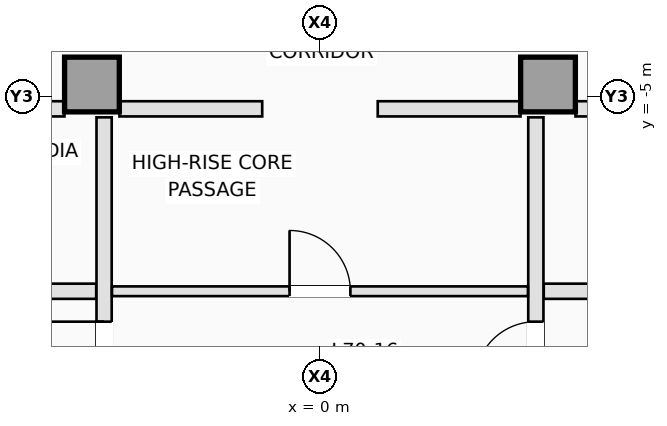
"""IFC4 building model, lengths in metres.
Left out: names, types, materials, properties, quantities, classifications, styles, units other than length and angle.
Written with IfcOpenShell. Run it as: python <this file> out.ifc"""

import sys

from ifc_helpers import new_model, si_unit, direction, frame, frame_2d, origin, origin_2d, place, context, subcontext, project, spatial, rectangle, extrude, element, fill, save


model = new_model("IFC4")
c1 = context("Model", 3, precision=1e-05, world=origin(), true_north=direction((0.0, 1.0)))
c2 = subcontext(c1, "Body", "Model", "MODEL_VIEW")
j1 = project(units=[si_unit("LENGTHUNIT", "METRE"), si_unit("PLANEANGLEUNIT", "RADIAN")], contexts=[c1])
p1 = place(None, origin())
s1 = spatial("IfcSite", under=j1, at=p1, CompositionType="ELEMENT")
p2 = place(p1, origin())
s2 = spatial("IfcBuilding", under=s1, at=p2, CompositionType="ELEMENT")
p3 = place(p2, frame((0.0, 0.0, 253.4)))
s3 = spatial("IfcBuildingStorey", under=s2, at=p3, CompositionType="ELEMENT", Elevation=253.4)
for number, where, z_axis, x_axis in (
    (1, (-3.75, -4.8, 0.0), (0.0, 0.0, 1.0), (1.0, 0.0, 0.0)),
    (2, (3.75, -4.8, 0.0), (0.0, 0.0, 1.0), (1.0, 0.0, 0.0)),
):
    element("IfcColumn", number, at=place(p3, frame(where, z_axis=z_axis, x_axis=x_axis)), inside=s3, PredefinedType="COLUMN", context=c2, shape_type="SweptSolid", body=[
        extrude(rectangle(XDim=0.9, YDim=0.9, at=origin_2d()), origin(), (0.0, 0.0, 1.0), 3.5),
    ])
for number, where, z_axis, x_axis in (
    (3, (-8.92, -8.2, 0.0), (0.0, 0.0, 1.0), (1.0, 0.0, 0.0)),
    (4, (3.68, -8.2, 0.0), (0.0, 0.0, 1.0), (1.0, 0.0, 0.0)),
):
    element("IfcWall", number, at=place(p3, frame(where, z_axis=z_axis, x_axis=x_axis)), inside=s3, PredefinedType="PARTITIONING", context=c2, shape_type="SweptSolid", body=[
        extrude(rectangle(XDim=5.24, YDim=0.25, at=frame_2d((2.62, 0.0))), origin(), (0.0, 0.0, 1.0), 3.25),
    ])
p4 = place(p3, frame((-3.55, -15.898, 0.0), z_axis=(0.0, 0.0, 1.0), x_axis=(0.0, 1.0, 0.0)))
e5 = element("IfcWall", 5, at=p4, inside=s3, PredefinedType="PARTITIONING", context=c2, shape_type="SweptSolid", body=[
    extrude(rectangle(XDim=10.558, YDim=0.25, at=frame_2d((5.279, 0.0))), origin(), (0.0, 0.0, 1.0), 3.25),
])
p5 = place(p4, frame((6.198, 0.0, 0.0)))
e6 = element("IfcOpeningElement", 6, at=p5, cuts=e5, PredefinedType="OPENING", context=c2, shape_type="SweptSolid", body=[
    extrude(rectangle(XDim=1.0, YDim=2.15, at=frame_2d((0.5, 1.075))), frame((0.0, 0.135, 0.0), z_axis=(0.0, -1.0, 0.0), x_axis=(1.0, 0.0, 0.0)), (0.0, 0.0, 1.0), 0.27),
])
p6 = place(p3, frame((3.55, -15.898, 0.0), z_axis=(0.0, 0.0, 1.0), x_axis=(0.0, 1.0, 0.0)))
e7 = element("IfcWall", 7, at=p6, inside=s3, PredefinedType="PARTITIONING", context=c2, shape_type="SweptSolid", body=[
    extrude(rectangle(XDim=10.558, YDim=0.25, at=frame_2d((5.279, 0.0))), origin(), (0.0, 0.0, 1.0), 3.25),
])
p7 = place(p6, frame((6.198, 0.0, 0.0)))
e8 = element("IfcOpeningElement", 8, at=p7, cuts=e7, PredefinedType="OPENING", context=c2, shape_type="SweptSolid", body=[
    extrude(rectangle(XDim=1.0, YDim=2.15, at=frame_2d((0.5, 1.075))), frame((0.0, 0.135, 0.0), z_axis=(0.0, -1.0, 0.0), x_axis=(1.0, 0.0, 0.0)), (0.0, 0.0, 1.0), 0.27),
])
p8 = place(p3, frame((-12.48, -5.2, 0.0), z_axis=(0.0, 0.0, 1.0), x_axis=(1.0, 0.0, 0.0)))
e9 = element("IfcWall", 9, at=p8, inside=s3, PredefinedType="PARTITIONING", context=c2, shape_type="SweptSolid", body=[
    extrude(rectangle(XDim=8.278, YDim=0.25, at=frame_2d((4.139, 0.0))), origin(), (0.0, 0.0, 1.0), 3.25),
])
p9 = place(p8, frame((3.05, 0.0, 0.0)))
e10 = element("IfcOpeningElement", 10, at=p9, cuts=e9, PredefinedType="OPENING", context=c2, shape_type="SweptSolid", body=[
    extrude(rectangle(XDim=0.92, YDim=2.12, at=frame_2d((0.46, 1.06))), frame((0.0, 0.135, 0.0), z_axis=(0.0, -1.0, 0.0), x_axis=(1.0, 0.0, 0.0)), (0.0, 0.0, 1.0), 0.27),
])
p10 = place(p8, frame((6.15, 0.0, 0.0)))
e11 = element("IfcOpeningElement", 11, at=p10, cuts=e9, PredefinedType="OPENING", context=c2, shape_type="SweptSolid", body=[
    extrude(rectangle(XDim=0.92, YDim=2.12, at=frame_2d((0.46, 1.06))), frame((0.0, 0.135, 0.0), z_axis=(0.0, -1.0, 0.0), x_axis=(1.0, 0.0, 0.0)), (0.0, 0.0, 1.0), 0.27),
])
p11 = place(p3, frame((4.202, -5.2, 0.0), z_axis=(0.0, 0.0, 1.0), x_axis=(1.0, 0.0, 0.0)))
e12 = element("IfcWall", 12, at=p11, inside=s3, PredefinedType="PARTITIONING", context=c2, shape_type="SweptSolid", body=[
    extrude(rectangle(XDim=8.278, YDim=0.25, at=frame_2d((4.139, 0.0))), origin(), (0.0, 0.0, 1.0), 3.25),
])
p12 = place(p11, frame((0.748, 0.0, 0.0)))
e13 = element("IfcOpeningElement", 13, at=p12, cuts=e12, PredefinedType="OPENING", context=c2, shape_type="SweptSolid", body=[
    extrude(rectangle(XDim=1.0, YDim=2.15, at=frame_2d((0.5, 1.075))), frame((0.0, 0.135, 0.0), z_axis=(0.0, -1.0, 0.0), x_axis=(1.0, 0.0, 0.0)), (0.0, 0.0, 1.0), 0.27),
])
p13 = place(p11, frame((2.698, 0.0, 0.0)))
e14 = element("IfcOpeningElement", 14, at=p13, cuts=e12, PredefinedType="OPENING", context=c2, shape_type="SweptSolid", body=[
    extrude(rectangle(XDim=1.0, YDim=2.15, at=frame_2d((0.5, 1.075))), frame((0.0, 0.135, 0.0), z_axis=(0.0, -1.0, 0.0), x_axis=(1.0, 0.0, 0.0)), (0.0, 0.0, 1.0), 0.27),
])
p14 = place(p11, frame((4.648, 0.0, 0.0)))
e15 = element("IfcOpeningElement", 15, at=p14, cuts=e12, PredefinedType="OPENING", context=c2, shape_type="SweptSolid", body=[
    extrude(rectangle(XDim=1.0, YDim=2.15, at=frame_2d((0.5, 1.075))), frame((0.0, 0.135, 0.0), z_axis=(0.0, -1.0, 0.0), x_axis=(1.0, 0.0, 0.0)), (0.0, 0.0, 1.0), 0.27),
])
p15 = place(p11, frame((6.598, 0.0, 0.0)))
e16 = element("IfcOpeningElement", 16, at=p15, cuts=e12, PredefinedType="OPENING", context=c2, shape_type="SweptSolid", body=[
    extrude(rectangle(XDim=1.0, YDim=2.15, at=frame_2d((0.5, 1.075))), frame((0.0, 0.135, 0.0), z_axis=(0.0, -1.0, 0.0), x_axis=(1.0, 0.0, 0.0)), (0.0, 0.0, 1.0), 0.27),
])
for number, where, z_axis, x_axis in (
    (17, (-3.298, -5.2, 0.0), (0.0, 0.0, 1.0), (1.0, 0.0, 0.0)),
    (18, (0.95, -5.2, 0.0), (0.0, 0.0, 1.0), (1.0, 0.0, 0.0)),
):
    element("IfcWall", number, at=place(p3, frame(where, z_axis=z_axis, x_axis=x_axis)), inside=s3, PredefinedType="PARTITIONING", context=c2, shape_type="SweptSolid", body=[
        extrude(rectangle(XDim=2.348, YDim=0.25, at=frame_2d((1.174, 0.0))), origin(), (0.0, 0.0, 1.0), 3.25),
    ])
p16 = place(p3, frame((-3.42, -8.2, 0.0), z_axis=(0.0, 0.0, 1.0), x_axis=(1.0, 0.0, 0.0)))
e19 = element("IfcWall", 19, at=p16, inside=s3, PredefinedType="PARTITIONING", context=c2, shape_type="SweptSolid", body=[
    extrude(rectangle(XDim=6.84, YDim=0.16, at=frame_2d((3.42, 0.0))), origin(), (0.0, 0.0, 1.0), 3.25),
])
p17 = place(p16, frame((2.92, 0.0, 0.0)))
e20 = element("IfcOpeningElement", 20, at=p17, cuts=e19, PredefinedType="OPENING", context=c2, shape_type="SweptSolid", body=[
    extrude(rectangle(XDim=1.0, YDim=2.15, at=frame_2d((0.5, 1.075))), frame((0.0, 0.09, 0.0), z_axis=(0.0, -1.0, 0.0), x_axis=(1.0, 0.0, 0.0)), (0.0, 0.0, 1.0), 0.18),
])
p18 = place(p5, origin())
e21 = element("IfcDoor", 21, at=p18, inside=s3, OperationType="SINGLE_SWING_RIGHT", PredefinedType="DOOR", context=c2, shape_type="SweptSolid", body=[
    extrude(rectangle(XDim=1.0, YDim=2.15, at=frame_2d((0.5, 1.075))), frame((0.0, 0.025, 0.0), z_axis=(0.0, -1.0, 0.0), x_axis=(1.0, 0.0, 0.0)), (0.0, 0.0, 1.0), 0.05),
])
fill(e6, e21)
p19 = place(p7, origin())
e22 = element("IfcDoor", 22, at=p19, inside=s3, OperationType="SINGLE_SWING_LEFT", PredefinedType="DOOR", context=c2, shape_type="SweptSolid", body=[
    extrude(rectangle(XDim=1.0, YDim=2.15, at=frame_2d((0.5, 1.075))), frame((0.0, 0.025, 0.0), z_axis=(0.0, -1.0, 0.0), x_axis=(1.0, 0.0, 0.0)), (0.0, 0.0, 1.0), 0.05),
])
fill(e8, e22)
p20 = place(p17, origin())
e23 = element("IfcDoor", 23, at=p20, inside=s3, OperationType="SINGLE_SWING_LEFT", PredefinedType="DOOR", context=c2, shape_type="SweptSolid", body=[
    extrude(rectangle(XDim=1.0, YDim=2.15, at=frame_2d((0.5, 1.075))), frame((0.0, 0.025, 0.0), z_axis=(0.0, -1.0, 0.0), x_axis=(1.0, 0.0, 0.0)), (0.0, 0.0, 1.0), 0.05),
])
fill(e20, e23)
save(model, sys.argv[1])
